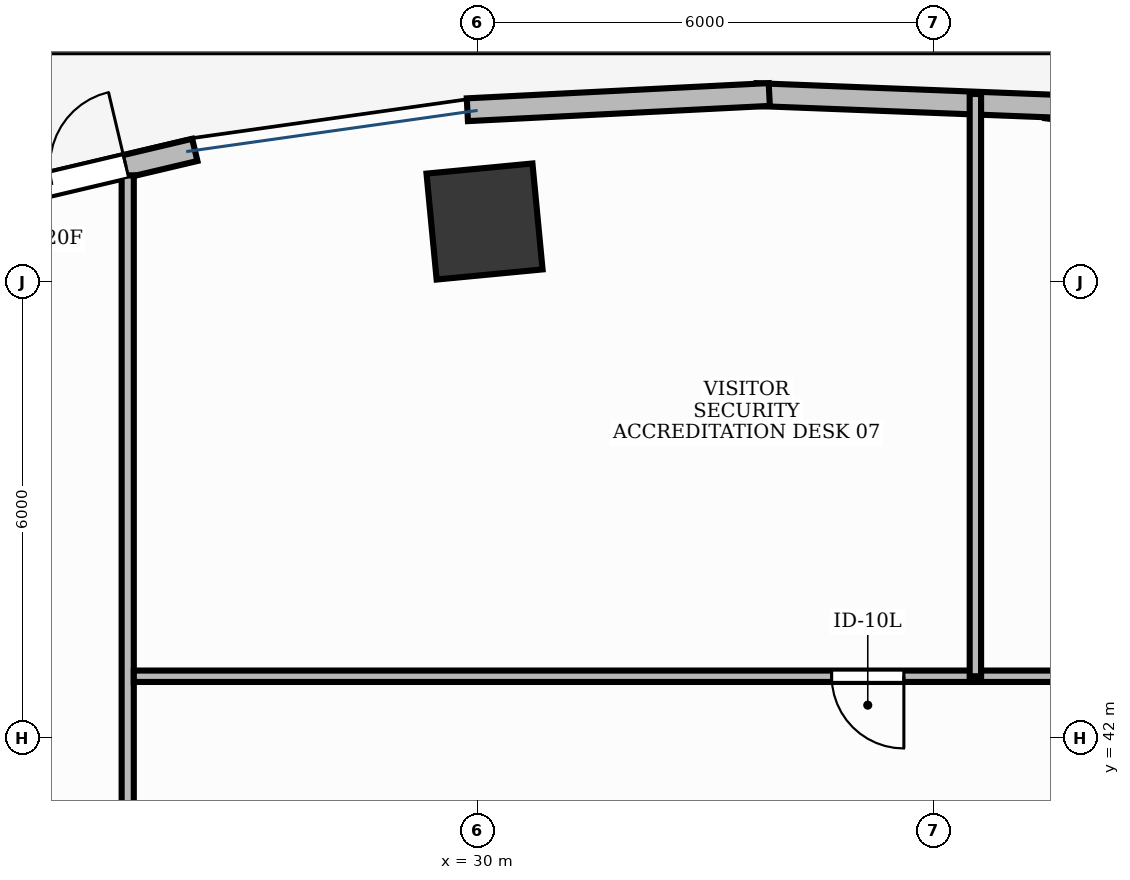
"""IFC4 building model, lengths in metres.
Left out: names, types, materials, properties, quantities, classifications, styles, units other than length and angle.
Written with IfcOpenShell. Run it as: python <this file> out.ifc"""

import sys

from ifc_helpers import new_model, si_unit, direction, frame, frame_2d, origin, origin_2d, place, context, subcontext, project, spatial, rectangle, extrude, element, fill, save


model = new_model("IFC4")
c1 = context("Model", 3, precision=1e-05, world=origin(), true_north=direction((0.0, 1.0)))
c2 = subcontext(c1, "Body", "Model", "MODEL_VIEW")
j1 = project(units=[si_unit("LENGTHUNIT", "METRE"), si_unit("PLANEANGLEUNIT", "RADIAN")], contexts=[c1])
p1 = place(None, origin())
s1 = spatial("IfcSite", under=j1, at=p1, CompositionType="ELEMENT")
p2 = place(p1, origin())
s2 = spatial("IfcBuilding", under=s1, at=p2, CompositionType="ELEMENT")
p3 = place(p2, origin())
s3 = spatial("IfcBuildingStorey", under=s2, at=p3, CompositionType="ELEMENT", Elevation=0.0)
p4 = place(p3, frame((30.094, 48.792, -0.0), z_axis=(0.0, 0.0, 1.0), x_axis=(0.995462868748, 0.095150811579, 0.0)))
e1 = element("IfcColumn", 1, at=p4, inside=s3, PredefinedType="COLUMN", context=c2, shape_type="SweptSolid", body=[
    extrude(rectangle(XDim=1.4, YDim=1.4, at=origin_2d()), origin(), (0.0, 0.0, 1.0), 5.101),
])
p5 = place(p3, frame((41.373, 49.798, 0.0), z_axis=(0.0, 0.0, 1.0), x_axis=(-0.991741322416, 0.128254237408, 0.0)))
e2 = element("IfcWall", 2, at=p5, inside=s3, PredefinedType="STANDARD", context=c2, shape_type="SweptSolid", body=[
    extrude(rectangle(XDim=3.916, YDim=0.3, at=frame_2d((1.958, 0.0))), origin(), (0.0, 0.0, 1.0), 5.1),
])
p6 = place(p5, frame((0.758, 0.0, 1.5)))
e3 = element("IfcOpeningElement", 3, at=p6, cuts=e2, PredefinedType="OPENING", context=c2, shape_type="SweptSolid", body=[
    extrude(rectangle(XDim=2.4, YDim=1.2, at=frame_2d((1.2, 0.6))), frame((0.0, 0.165, 0.0), z_axis=(0.0, -1.0, 0.0), x_axis=(1.0, 0.0, 0.0)), (0.0, 0.0, 1.0), 0.33),
])
p7 = place(p3, frame((22.525, 48.847, 0.0), z_axis=(0.0, 0.0, 1.0), x_axis=(0.973186156802, 0.230018921417, 0.0)))
e4 = element("IfcWall", 4, at=p7, inside=s3, PredefinedType="STANDARD", context=c2, shape_type="SweptSolid", body=[
    extrude(rectangle(XDim=3.861, YDim=0.3, at=frame_2d((1.931, 0.0))), origin(), (0.0, 0.0, 1.0), 5.1),
])
p8 = place(p7, frame((0.931, 0.0, 0.0)))
e5 = element("IfcOpeningElement", 5, at=p8, cuts=e4, PredefinedType="OPENING", context=c2, shape_type="SweptSolid", body=[
    extrude(rectangle(XDim=2.0, YDim=2.3, at=frame_2d((1.0, 1.15))), frame((0.0, 0.165, 0.0), z_axis=(0.0, -1.0, 0.0), x_axis=(1.0, 0.0, 0.0)), (0.0, 0.0, 1.0), 0.33),
])
p9 = place(p3, frame((37.644, 50.308, 0.0), z_axis=(0.0, 0.0, 1.0), x_axis=(-0.999245411623, 0.038840794937, 0.0)))
e6 = element("IfcWall", 6, at=p9, inside=s3, PredefinedType="STANDARD", context=c2, shape_type="SweptSolid", body=[
    extrude(rectangle(XDim=3.979, YDim=0.3, at=frame_2d((1.989, 0.0))), origin(), (0.0, 0.0, 1.0), 5.1),
])
p10 = place(p3, frame((33.84, 50.463, 0.0), z_axis=(0.0, 0.0, 1.0), x_axis=(-0.998732359232, -0.050335619826, 0.0)))
e7 = element("IfcWall", 7, at=p10, inside=s3, PredefinedType="STANDARD", context=c2, shape_type="SweptSolid", body=[
    extrude(rectangle(XDim=3.977, YDim=0.3, at=frame_2d((1.989, 0.0))), origin(), (0.0, 0.0, 1.0), 5.1),
])
p11 = place(p3, frame((25.4, 35.65, 0.0), z_axis=(0.0, 0.0, 1.0), x_axis=(0.0, 1.0, 0.0)))
e8 = element("IfcWall", 8, at=p11, inside=s3, PredefinedType="PARTITIONING", context=c2, shape_type="SweptSolid", body=[
    extrude(rectangle(XDim=13.75, YDim=0.16, at=frame_2d((6.875, 0.0))), origin(), (0.0, 0.0, 1.0), 4.11),
])
p12 = place(p3, frame((43.2, 42.81, 0.0), z_axis=(0.0, 0.0, 1.0), x_axis=(-1.0, 0.0, 0.0)))
e9 = element("IfcWall", 9, at=p12, inside=s3, PredefinedType="PARTITIONING", context=c2, shape_type="SweptSolid", body=[
    extrude(rectangle(XDim=6.648, YDim=0.15, at=frame_2d((3.324, 0.0))), origin(), (0.0, 0.0, 1.0), 4.11),
])
p13 = place(p12, frame((0.553, 0.0, 0.0)))
e10 = element("IfcOpeningElement", 10, at=p13, cuts=e9, PredefinedType="OPENING", context=c2, shape_type="SweptSolid", body=[
    extrude(rectangle(XDim=0.95, YDim=2.15, at=frame_2d((0.475, 1.075))), frame((0.0, 0.09, 0.0), z_axis=(0.0, -1.0, 0.0), x_axis=(1.0, 0.0, 0.0)), (0.0, 0.0, 1.0), 0.18),
])
p14 = place(p3, frame((36.542, 42.81, 0.0), z_axis=(0.0, 0.0, 1.0), x_axis=(-1.0, 0.0, 0.0)))
e11 = element("IfcWall", 11, at=p14, inside=s3, PredefinedType="PARTITIONING", context=c2, shape_type="SweptSolid", body=[
    extrude(rectangle(XDim=11.062, YDim=0.15, at=frame_2d((5.531, 0.0))), origin(), (0.0, 0.0, 1.0), 4.11),
])
p15 = place(p14, frame((0.931, 0.0, 0.0)))
e12 = element("IfcOpeningElement", 12, at=p15, cuts=e11, PredefinedType="OPENING", context=c2, shape_type="SweptSolid", body=[
    extrude(rectangle(XDim=0.95, YDim=2.15, at=frame_2d((0.475, 1.075))), frame((0.0, 0.09, 0.0), z_axis=(0.0, -1.0, 0.0), x_axis=(1.0, 0.0, 0.0)), (0.0, 0.0, 1.0), 0.18),
])
p16 = place(p3, frame((36.552, 42.81, 0.0), z_axis=(0.0, 0.0, 1.0), x_axis=(0.0, 1.0, 0.0)))
e13 = element("IfcWall", 13, at=p16, inside=s3, PredefinedType="PARTITIONING", context=c2, shape_type="SweptSolid", body=[
    extrude(rectangle(XDim=7.66, YDim=0.15, at=frame_2d((3.83, 0.0))), origin(), (0.0, 0.0, 1.0), 4.11),
])
p17 = place(p8, origin())
e14 = element("IfcDoor", 14, at=p17, inside=s3, OperationType="DOUBLE_DOOR_SINGLE_SWING", PredefinedType="DOOR", context=c2, shape_type="SweptSolid", body=[
    extrude(rectangle(XDim=2.0, YDim=2.3, at=frame_2d((1.0, 1.15))), frame((0.0, 0.025, 0.0), z_axis=(0.0, -1.0, 0.0), x_axis=(1.0, 0.0, 0.0)), (0.0, 0.0, 1.0), 0.05),
])
fill(e5, e14)
p18 = place(p15, origin())
e15 = element("IfcDoor", 15, at=p18, inside=s3, OperationType="SINGLE_SWING_LEFT", PredefinedType="DOOR", context=c2, shape_type="SweptSolid", body=[
    extrude(rectangle(XDim=0.95, YDim=2.15, at=frame_2d((0.475, 1.075))), frame((0.0, 0.025, 0.0), z_axis=(0.0, -1.0, 0.0), x_axis=(1.0, 0.0, 0.0)), (0.0, 0.0, 1.0), 0.05),
])
fill(e12, e15)
save(model, sys.argv[1])
